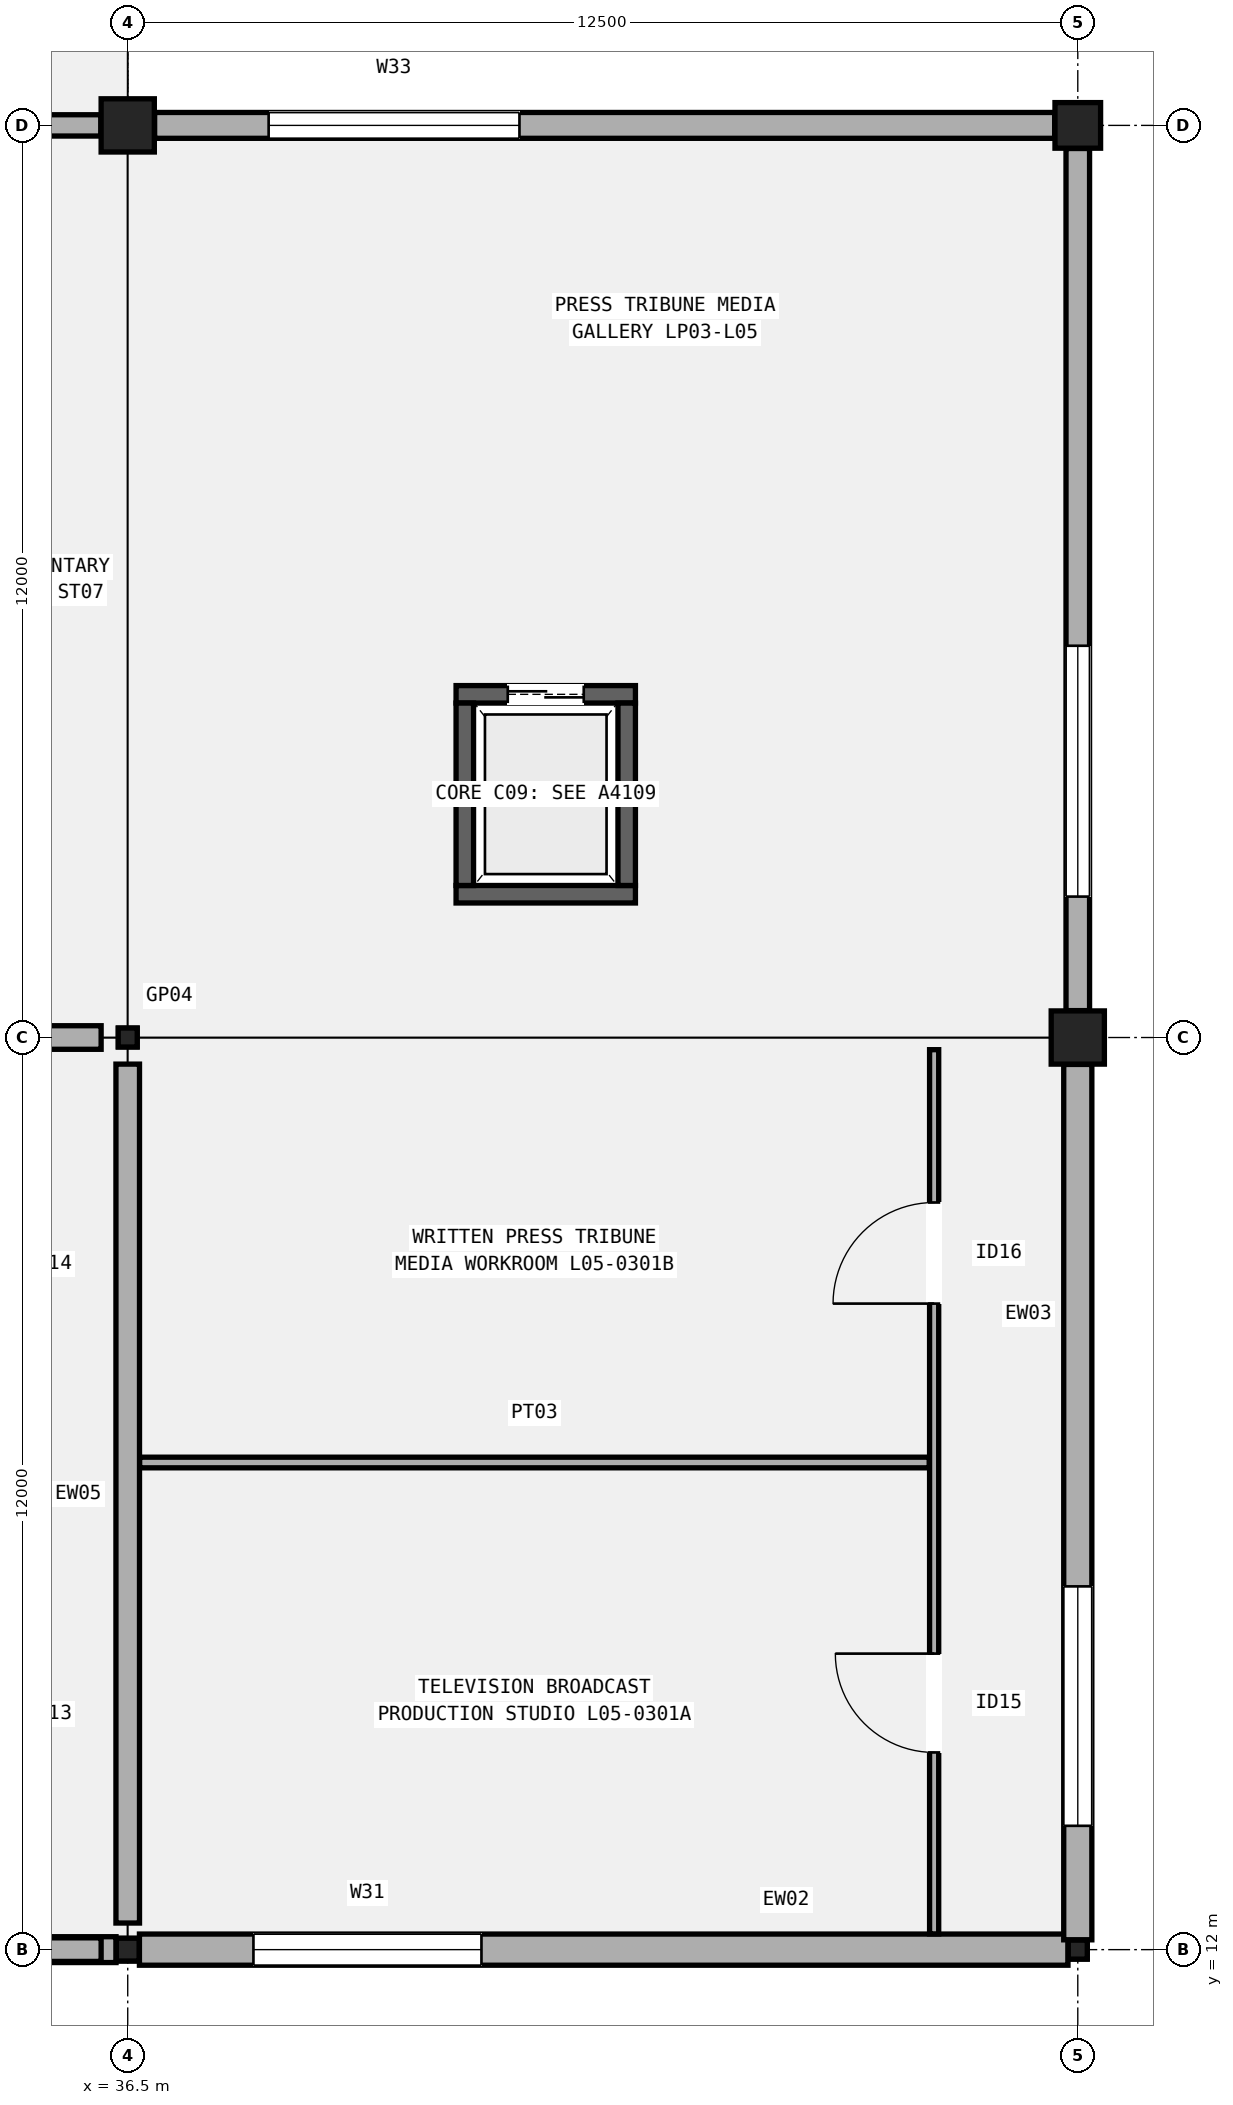
"""IFC4 building model, lengths in metres.
Left out: names, types, materials, properties, quantities, classifications, styles, units other than length and angle.
Written with IfcOpenShell. Run it as: python <this file> out.ifc"""

import sys

from ifc_helpers import new_model, si_unit, direction, frame, frame_2d, origin, origin_2d, place, context, subcontext, project, spatial, rectangle, hollow_rectangle, extrude, element, fill, save


model = new_model("IFC4")
c1 = context("Model", 3, precision=1e-05, world=origin(), true_north=direction((0.0, 1.0)))
c2 = subcontext(c1, "Body", "Model", "MODEL_VIEW")
j1 = project(units=[si_unit("LENGTHUNIT", "METRE"), si_unit("PLANEANGLEUNIT", "RADIAN")], contexts=[c1])
p1 = place(None, origin())
s1 = spatial("IfcSite", under=j1, at=p1, CompositionType="ELEMENT")
p2 = place(p1, origin())
s2 = spatial("IfcBuilding", under=s1, at=p2, CompositionType="ELEMENT")
p3 = place(p2, frame((0.0, 0.0, 25.8)))
s3 = spatial("IfcBuildingStorey", under=s2, at=p3, CompositionType="ELEMENT", Elevation=25.8)
p4 = place(p3, frame((36.5, 12.0, 0.0), z_axis=(0.0, 0.0, 1.0), x_axis=(1.0, 0.0, 0.0)))
e1 = element("IfcColumn", 1, at=p4, inside=s3, PredefinedType="COLUMN", context=c2, shape_type="SweptSolid", body=[
    extrude(hollow_rectangle(XDim=0.3, YDim=0.3, WallThickness=0.012, InnerFilletRadius=0.012, OuterFilletRadius=0.024, at=origin_2d()), origin(), (0.0, 0.0, 1.0), 5.4),
])
p5 = place(p3, frame((36.5, 24.0, 0.0), z_axis=(0.0, 0.0, 1.0), x_axis=(1.0, 0.0, 0.0)))
e2 = element("IfcColumn", 2, at=p5, inside=s3, PredefinedType="COLUMN", context=c2, shape_type="SweptSolid", body=[
    extrude(hollow_rectangle(XDim=0.25, YDim=0.25, WallThickness=0.012, InnerFilletRadius=0.012, OuterFilletRadius=0.024, at=origin_2d()), origin(), (0.0, 0.0, 1.0), 5.4),
])
p6 = place(p3, frame((36.5, 36.0, 0.0), z_axis=(0.0, 0.0, 1.0), x_axis=(1.0, 0.0, 0.0)))
e3 = element("IfcColumn", 3, at=p6, inside=s3, PredefinedType="COLUMN", context=c2, shape_type="SweptSolid", body=[
    extrude(rectangle(XDim=0.7, YDim=0.7, at=origin_2d()), origin(), (0.0, 0.0, 1.0), 5.4),
])
p7 = place(p3, frame((49.0, 12.0, 0.0), z_axis=(0.0, 0.0, 1.0), x_axis=(1.0, 0.0, 0.0)))
e4 = element("IfcColumn", 4, at=p7, inside=s3, PredefinedType="COLUMN", context=c2, shape_type="SweptSolid", body=[
    extrude(hollow_rectangle(XDim=0.25, YDim=0.25, WallThickness=0.012, InnerFilletRadius=0.012, OuterFilletRadius=0.024, at=origin_2d()), origin(), (0.0, 0.0, 1.0), 5.4),
])
p8 = place(p3, frame((49.0, 24.0, 0.0), z_axis=(0.0, 0.0, 1.0), x_axis=(1.0, 0.0, 0.0)))
e5 = element("IfcColumn", 5, at=p8, inside=s3, PredefinedType="COLUMN", context=c2, shape_type="SweptSolid", body=[
    extrude(rectangle(XDim=0.7, YDim=0.7, at=origin_2d()), origin(), (0.0, 0.0, 1.0), 5.4),
])
p9 = place(p3, frame((49.0, 36.0, 0.0), z_axis=(0.0, 0.0, 1.0), x_axis=(1.0, 0.0, 0.0)))
e6 = element("IfcColumn", 6, at=p9, inside=s3, PredefinedType="COLUMN", context=c2, shape_type="SweptSolid", body=[
    extrude(rectangle(XDim=0.6, YDim=0.6, at=origin_2d()), origin(), (0.0, 0.0, 1.0), 5.4),
])
p10 = place(p3, frame((24.179, 12.0, 0.0), z_axis=(0.0, 0.0, 1.0), x_axis=(1.0, 0.0, 0.0)))
e7 = element("IfcWall", 7, at=p10, inside=s3, PredefinedType="SOLIDWALL", context=c2, shape_type="SweptSolid", body=[
    extrude(rectangle(XDim=12.167, YDim=0.34, at=frame_2d((6.083, 0.0))), origin(), (0.0, 0.0, 1.0), 4.34),
])
p11 = place(p10, frame((1.5, 0.0, 0.95)))
e8 = element("IfcOpeningElement", 8, at=p11, cuts=e7, PredefinedType="OPENING", context=c2, shape_type="SweptSolid", body=[
    extrude(rectangle(XDim=2.7, YDim=1.75, at=frame_2d((1.35, 0.875))), frame((0.0, 0.18, 0.0), z_axis=(0.0, -1.0, 0.0), x_axis=(1.0, 0.0, 0.0)), (0.0, 0.0, 1.0), 0.36),
])
p12 = place(p3, frame((24.129, 36.0, 0.0), z_axis=(0.0, 0.0, 1.0), x_axis=(1.0, 0.0, 0.0)))
e9 = element("IfcWall", 9, at=p12, inside=s3, PredefinedType="SOLIDWALL", context=c2, shape_type="SweptSolid", body=[
    extrude(rectangle(XDim=12.017, YDim=0.28, at=frame_2d((6.009, 0.0))), origin(), (0.0, 0.0, 1.0), 4.452),
])
p13 = place(p12, frame((1.5, 0.0, 0.95)))
e10 = element("IfcOpeningElement", 10, at=p13, cuts=e9, PredefinedType="OPENING", context=c2, shape_type="SweptSolid", body=[
    extrude(rectangle(XDim=2.85, YDim=2.0, at=frame_2d((1.425, 1.0))), frame((0.0, 0.15, 0.0), z_axis=(0.0, -1.0, 0.0), x_axis=(1.0, 0.0, 0.0)), (0.0, 0.0, 1.0), 0.3),
])
p14 = place(p3, frame((36.654, 12.0, 0.0), z_axis=(0.0, 0.0, 1.0), x_axis=(1.0, 0.0, 0.0)))
e11 = element("IfcWall", 11, at=p14, inside=s3, PredefinedType="SOLIDWALL", context=c2, shape_type="SweptSolid", body=[
    extrude(rectangle(XDim=12.217, YDim=0.41, at=frame_2d((6.108, 0.0))), origin(), (0.0, 0.0, 1.0), 4.44),
])
p15 = place(p14, frame((1.5, 0.0, 0.95)))
e12 = element("IfcOpeningElement", 12, at=p15, cuts=e11, PredefinedType="OPENING", context=c2, shape_type="SweptSolid", body=[
    extrude(rectangle(XDim=3.0, YDim=2.15, at=frame_2d((1.5, 1.075))), frame((0.0, 0.215, 0.0), z_axis=(0.0, -1.0, 0.0), x_axis=(1.0, 0.0, 0.0)), (0.0, 0.0, 1.0), 0.43),
])
p16 = place(p3, frame((49.0, 12.129, 0.0), z_axis=(0.0, 0.0, 1.0), x_axis=(0.0, 1.0, 0.0)))
e13 = element("IfcWall", 13, at=p16, inside=s3, PredefinedType="SOLIDWALL", context=c2, shape_type="SweptSolid", body=[
    extrude(rectangle(XDim=11.517, YDim=0.37, at=frame_2d((5.759, 0.0))), origin(), (0.0, 0.0, 1.0), 4.452),
])
p17 = place(p16, frame((1.5, 0.0, 0.95)))
e14 = element("IfcOpeningElement", 14, at=p17, cuts=e13, PredefinedType="OPENING", context=c2, shape_type="SweptSolid", body=[
    extrude(rectangle(XDim=3.15, YDim=1.9, at=frame_2d((1.575, 0.95))), frame((0.0, 0.195, 0.0), z_axis=(0.0, -1.0, 0.0), x_axis=(1.0, 0.0, 0.0)), (0.0, 0.0, 1.0), 0.39),
])
p18 = place(p3, frame((36.854, 36.0, 0.0), z_axis=(0.0, 0.0, 1.0), x_axis=(1.0, 0.0, 0.0)))
e15 = element("IfcWall", 15, at=p18, inside=s3, PredefinedType="SOLIDWALL", context=c2, shape_type="SweptSolid", body=[
    extrude(rectangle(XDim=11.842, YDim=0.34, at=frame_2d((5.921, 0.0))), origin(), (0.0, 0.0, 1.0), 4.13),
])
p19 = place(p18, frame((1.5, 0.0, 0.95)))
e16 = element("IfcOpeningElement", 16, at=p19, cuts=e15, PredefinedType="OPENING", context=c2, shape_type="SweptSolid", body=[
    extrude(rectangle(XDim=3.3, YDim=1.8, at=frame_2d((1.65, 0.9))), frame((0.0, 0.18, 0.0), z_axis=(0.0, -1.0, 0.0), x_axis=(1.0, 0.0, 0.0)), (0.0, 0.0, 1.0), 0.36),
])
p20 = place(p3, frame((49.0, 24.354, 0.0), z_axis=(0.0, 0.0, 1.0), x_axis=(0.0, 1.0, 0.0)))
e17 = element("IfcWall", 17, at=p20, inside=s3, PredefinedType="SOLIDWALL", context=c2, shape_type="SweptSolid", body=[
    extrude(rectangle(XDim=11.342, YDim=0.31, at=frame_2d((5.671, 0.0))), origin(), (0.0, 0.0, 1.0), 4.34),
])
p21 = place(p20, frame((1.5, 0.0, 0.95)))
e18 = element("IfcOpeningElement", 18, at=p21, cuts=e17, PredefinedType="OPENING", context=c2, shape_type="SweptSolid", body=[
    extrude(rectangle(XDim=3.3, YDim=2.25, at=frame_2d((1.65, 1.125))), frame((0.0, 0.165, 0.0), z_axis=(0.0, -1.0, 0.0), x_axis=(1.0, 0.0, 0.0)), (0.0, 0.0, 1.0), 0.33),
])
p22 = place(p3, frame((24.35, 12.0, 5.4), z_axis=(0.0, 0.0, 1.0), x_axis=(1.0, 0.0, 0.0)))
e19 = element("IfcWall", 19, at=p22, inside=s3, PredefinedType="SOLIDWALL", context=c2, shape_type="SweptSolid", body=[
    extrude(rectangle(XDim=11.8, YDim=0.31, at=frame_2d((5.9, 0.0))), origin(), (0.0, 0.0, 1.0), 1.38),
])
p23 = place(p3, frame((24.35, 24.0, 5.4), z_axis=(0.0, 0.0, 1.0), x_axis=(1.0, 0.0, 0.0)))
e20 = element("IfcWall", 20, at=p23, inside=s3, PredefinedType="SOLIDWALL", context=c2, shape_type="SweptSolid", body=[
    extrude(rectangle(XDim=11.8, YDim=0.31, at=frame_2d((5.9, 0.0))), origin(), (0.0, 0.0, 1.0), 0.58),
])
p24 = place(p3, frame((36.5, 12.35, 5.4), z_axis=(0.0, 0.0, 1.0), x_axis=(0.0, 1.0, 0.0)))
e21 = element("IfcWall", 21, at=p24, inside=s3, PredefinedType="SOLIDWALL", context=c2, shape_type="SweptSolid", body=[
    extrude(rectangle(XDim=11.3, YDim=0.31, at=frame_2d((5.65, 0.0))), origin(), (0.0, 0.0, 1.0), 0.58),
])
p25 = place(p3, frame((40.82, 25.885, 0.0), z_axis=(0.0, 0.0, 1.0), x_axis=(1.0, 0.0, 0.0)))
e22 = element("IfcWall", 22, at=p25, inside=s3, PredefinedType="SHEAR", context=c2, shape_type="SweptSolid", body=[
    extrude(rectangle(XDim=2.36, YDim=0.23, at=frame_2d((1.18, 0.0))), origin(), (0.0, 0.0, 1.0), 5.04),
])
p26 = place(p3, frame((40.82, 28.515, 0.0), z_axis=(0.0, 0.0, 1.0), x_axis=(1.0, 0.0, 0.0)))
e23 = element("IfcWall", 23, at=p26, inside=s3, PredefinedType="SHEAR", context=c2, shape_type="SweptSolid", body=[
    extrude(rectangle(XDim=2.36, YDim=0.23, at=frame_2d((1.18, 0.0))), origin(), (0.0, 0.0, 1.0), 5.04),
])
p27 = place(p26, frame((0.68, 0.0, 0.0)))
e24 = element("IfcOpeningElement", 24, at=p27, cuts=e23, PredefinedType="OPENING", context=c2, shape_type="SweptSolid", body=[
    extrude(rectangle(XDim=1.0, YDim=2.15, at=frame_2d((0.5, 1.075))), frame((0.0, 0.125, 0.0), z_axis=(0.0, -1.0, 0.0), x_axis=(1.0, 0.0, 0.0)), (0.0, 0.0, 1.0), 0.25),
])
for number, where, z_axis, x_axis in (
    (25, (40.935, 26.0, 0.0), (0.0, 0.0, 1.0), (0.0, 1.0, 0.0)),
    (26, (43.065, 26.0, 0.0), (0.0, 0.0, 1.0), (0.0, 1.0, 0.0)),
):
    element("IfcWall", number, at=place(p3, frame(where, z_axis=z_axis, x_axis=x_axis)), inside=s3, PredefinedType="SHEAR", context=c2, shape_type="SweptSolid", body=[
        extrude(rectangle(XDim=2.4, YDim=0.23, at=frame_2d((1.2, 0.0))), origin(), (0.0, 0.0, 1.0), 5.04),
    ])
p28 = place(p3, frame((47.11, 12.207, 0.0), z_axis=(0.0, 0.0, 1.0), x_axis=(0.0, 1.0, 0.0)))
e27 = element("IfcWall", 27, at=p28, inside=s3, PredefinedType="PARTITIONING", context=c2, shape_type="SweptSolid", body=[
    extrude(rectangle(XDim=11.633, YDim=0.12, at=frame_2d((5.816, 0.0))), origin(), (0.0, 0.0, 1.0), 4.35),
])
p29 = place(p28, frame((2.387, 0.0, 0.0)))
e28 = element("IfcOpeningElement", 28, at=p29, cuts=e27, PredefinedType="OPENING", context=c2, shape_type="SweptSolid", body=[
    extrude(rectangle(XDim=1.3, YDim=2.24, at=frame_2d((0.65, 1.12))), frame((0.0, 0.07, 0.0), z_axis=(0.0, -1.0, 0.0), x_axis=(1.0, 0.0, 0.0)), (0.0, 0.0, 1.0), 0.14),
])
p30 = place(p28, frame((8.292, 0.0, 0.0)))
e29 = element("IfcOpeningElement", 29, at=p30, cuts=e27, PredefinedType="OPENING", context=c2, shape_type="SweptSolid", body=[
    extrude(rectangle(XDim=1.33, YDim=2.22, at=frame_2d((0.665, 1.11))), frame((0.0, 0.07, 0.0), z_axis=(0.0, -1.0, 0.0), x_axis=(1.0, 0.0, 0.0)), (0.0, 0.0, 1.0), 0.14),
])
p31 = place(p3, frame((36.657, 18.409, 0.0), z_axis=(0.0, 0.0, 1.0), x_axis=(1.0, 0.0, 0.0)))
e30 = element("IfcWall", 30, at=p31, inside=s3, PredefinedType="PARTITIONING", context=c2, shape_type="SweptSolid", body=[
    extrude(rectangle(XDim=10.388, YDim=0.14, at=frame_2d((5.194, 0.0))), origin(), (0.0, 0.0, 1.0), 4.35),
])
p32 = place(p15, origin())
e31 = element("IfcWindow", 31, at=p32, inside=s3, PartitioningType="SINGLE_PANEL", PredefinedType="WINDOW", context=c2, shape_type="SweptSolid", body=[
    extrude(rectangle(XDim=3.0, YDim=2.15, at=frame_2d((1.5, 1.075))), frame((0.0, 0.03, 0.0), z_axis=(0.0, -1.0, 0.0), x_axis=(1.0, 0.0, 0.0)), (0.0, 0.0, 1.0), 0.06),
])
fill(e12, e31)
p33 = place(p17, origin())
e32 = element("IfcWindow", 32, at=p33, inside=s3, PartitioningType="SINGLE_PANEL", PredefinedType="WINDOW", context=c2, shape_type="SweptSolid", body=[
    extrude(rectangle(XDim=3.15, YDim=1.9, at=frame_2d((1.575, 0.95))), frame((0.0, 0.03, 0.0), z_axis=(0.0, -1.0, 0.0), x_axis=(1.0, 0.0, 0.0)), (0.0, 0.0, 1.0), 0.06),
])
fill(e14, e32)
p34 = place(p19, origin())
e33 = element("IfcWindow", 33, at=p34, inside=s3, PartitioningType="SINGLE_PANEL", PredefinedType="WINDOW", context=c2, shape_type="SweptSolid", body=[
    extrude(rectangle(XDim=3.3, YDim=1.8, at=frame_2d((1.65, 0.9))), frame((0.0, 0.03, 0.0), z_axis=(0.0, -1.0, 0.0), x_axis=(1.0, 0.0, 0.0)), (0.0, 0.0, 1.0), 0.06),
])
fill(e16, e33)
p35 = place(p21, origin())
e34 = element("IfcWindow", 34, at=p35, inside=s3, PartitioningType="SINGLE_PANEL", PredefinedType="WINDOW", context=c2, shape_type="SweptSolid", body=[
    extrude(rectangle(XDim=3.3, YDim=2.25, at=frame_2d((1.65, 1.125))), frame((0.0, 0.03, 0.0), z_axis=(0.0, -1.0, 0.0), x_axis=(1.0, 0.0, 0.0)), (0.0, 0.0, 1.0), 0.06),
])
fill(e18, e34)
p36 = place(p27, origin())
e35 = element("IfcDoor", 35, at=p36, inside=s3, OperationType="DOUBLE_DOOR_SLIDING", PredefinedType="DOOR", context=c2, shape_type="SweptSolid", body=[
    extrude(rectangle(XDim=1.0, YDim=2.15, at=frame_2d((0.5, 1.075))), frame((0.0, 0.025, 0.0), z_axis=(0.0, -1.0, 0.0), x_axis=(1.0, 0.0, 0.0)), (0.0, 0.0, 1.0), 0.05),
])
fill(e24, e35)
p37 = place(p29, origin())
e36 = element("IfcDoor", 36, at=p37, inside=s3, OperationType="SINGLE_SWING_RIGHT", PredefinedType="DOOR", context=c2, shape_type="SweptSolid", body=[
    extrude(rectangle(XDim=1.3, YDim=2.24, at=frame_2d((0.65, 1.12))), frame((0.0, 0.025, 0.0), z_axis=(0.0, -1.0, 0.0), x_axis=(1.0, 0.0, 0.0)), (0.0, 0.0, 1.0), 0.05),
])
fill(e28, e36)
p38 = place(p30, origin())
e37 = element("IfcDoor", 37, at=p38, inside=s3, OperationType="SINGLE_SWING_LEFT", PredefinedType="DOOR", context=c2, shape_type="SweptSolid", body=[
    extrude(rectangle(XDim=1.33, YDim=2.22, at=frame_2d((0.665, 1.11))), frame((0.0, 0.025, 0.0), z_axis=(0.0, -1.0, 0.0), x_axis=(1.0, 0.0, 0.0)), (0.0, 0.0, 1.0), 0.05),
])
fill(e29, e37)
save(model, sys.argv[1])
